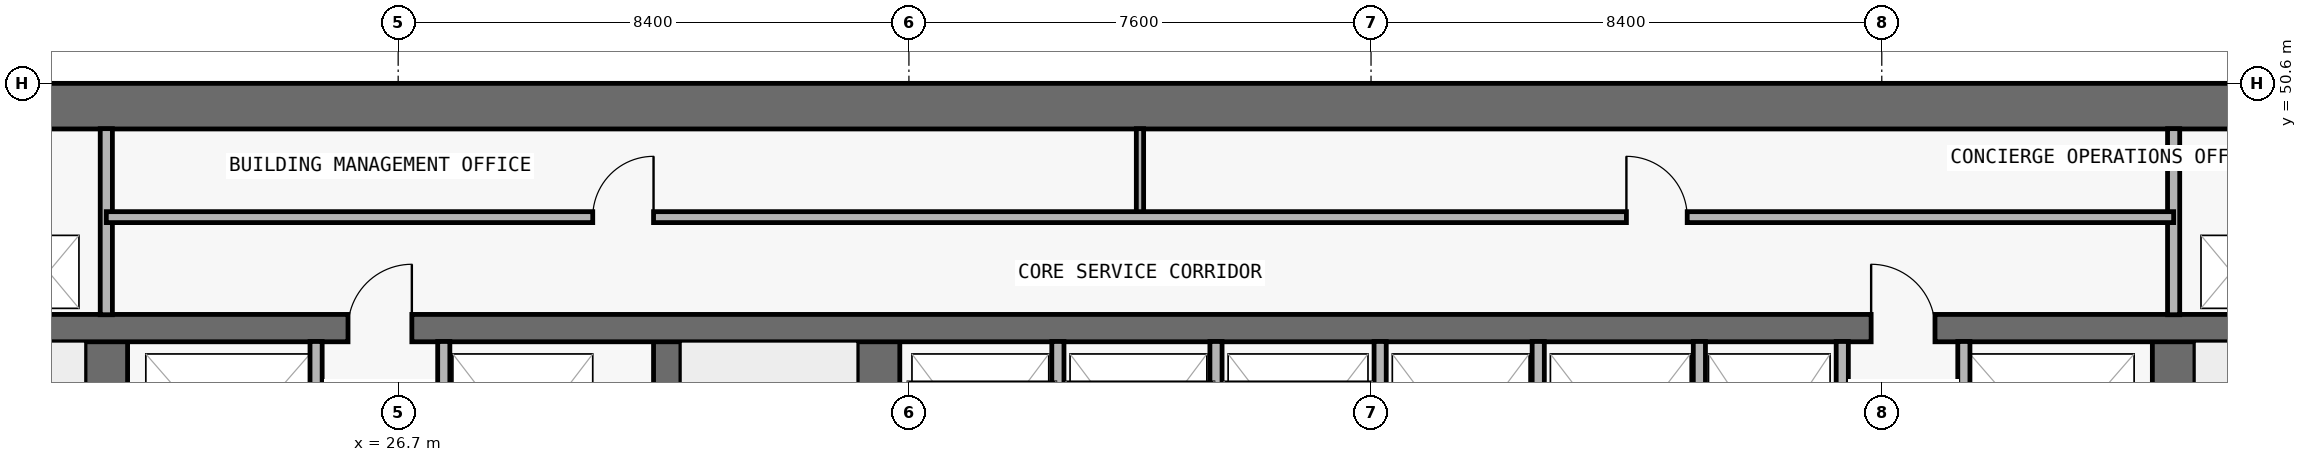
"""IFC4 building model, lengths in metres.
Left out: names, types, materials, properties, quantities, classifications, styles, units other than length and angle.
Written with IfcOpenShell. Run it as: python <this file> out.ifc"""

import sys

from ifc_helpers import new_model, si_unit, direction, frame, frame_2d, origin, place, context, subcontext, project, spatial, rectangle, extrude, element, fill, save


model = new_model("IFC4")
c1 = context("Model", 3, precision=1e-05, world=origin(), true_north=direction((0.0, 1.0)))
c2 = subcontext(c1, "Body", "Model", "MODEL_VIEW")
j1 = project(units=[si_unit("LENGTHUNIT", "METRE"), si_unit("PLANEANGLEUNIT", "RADIAN")], contexts=[c1])
p1 = place(None, origin())
s1 = spatial("IfcSite", under=j1, at=p1, CompositionType="ELEMENT")
p2 = place(p1, origin())
s2 = spatial("IfcBuilding", under=s1, at=p2, CompositionType="ELEMENT")
p3 = place(p2, frame((0.0, 0.0, 69.6)))
s3 = spatial("IfcBuildingStorey", under=s2, at=p3, CompositionType="ELEMENT", Elevation=69.6)
p4 = place(p3, frame((17.75, 50.225, 0.0), z_axis=(0.0, 0.0, 1.0), x_axis=(1.0, 0.0, 0.0)))
e1 = element("IfcWall", 1, at=p4, inside=s3, PredefinedType="SHEAR", context=c2, shape_type="SweptSolid", body=[
    extrude(rectangle(XDim=42.3, YDim=0.75, at=frame_2d((21.15, 0.0))), origin(), (0.0, 0.0, 1.0), 3.05),
])
p5 = place(p3, frame((21.9, 36.9, 0.0), z_axis=(0.0, 0.0, 1.0), x_axis=(0.0, 1.0, 0.0)))
e2 = element("IfcWall", 2, at=p5, inside=s3, PredefinedType="SHEAR", context=c2, shape_type="SweptSolid", body=[
    extrude(rectangle(XDim=9.675, YDim=0.7, at=frame_2d((4.837, 0.0))), origin(), (0.0, 0.0, 1.0), 3.05),
])
p6 = place(p5, frame((0.65, 0.0, 0.0)))
e3 = element("IfcOpeningElement", 3, at=p6, cuts=e2, PredefinedType="OPENING", context=c2, shape_type="SweptSolid", body=[
    extrude(rectangle(XDim=1.1, YDim=2.15, at=frame_2d((0.55, 1.075))), frame((0.0, 0.36, 0.0), z_axis=(0.0, -1.0, 0.0), x_axis=(1.0, 0.0, 0.0)), (0.0, 0.0, 1.0), 0.72),
])
p7 = place(p3, frame((55.9, 36.9, 0.0), z_axis=(0.0, 0.0, 1.0), x_axis=(0.0, 1.0, 0.0)))
e4 = element("IfcWall", 4, at=p7, inside=s3, PredefinedType="SHEAR", context=c2, shape_type="SweptSolid", body=[
    extrude(rectangle(XDim=9.675, YDim=0.7, at=frame_2d((4.837, 0.0))), origin(), (0.0, 0.0, 1.0), 3.05),
])
p8 = place(p7, frame((0.65, 0.0, 0.0)))
e5 = element("IfcOpeningElement", 5, at=p8, cuts=e4, PredefinedType="OPENING", context=c2, shape_type="SweptSolid", body=[
    extrude(rectangle(XDim=1.1, YDim=2.15, at=frame_2d((0.55, 1.075))), frame((0.0, 0.36, 0.0), z_axis=(0.0, -1.0, 0.0), x_axis=(1.0, 0.0, 0.0)), (0.0, 0.0, 1.0), 0.72),
])
p9 = place(p3, frame((31.125, 36.9, 0.0), z_axis=(0.0, 0.0, 1.0), x_axis=(0.0, 1.0, 0.0)))
e6 = element("IfcWall", 6, at=p9, inside=s3, PredefinedType="SHEAR", context=c2, shape_type="SweptSolid", body=[
    extrude(rectangle(XDim=9.675, YDim=0.45, at=frame_2d((4.837, 0.0))), origin(), (0.0, 0.0, 1.0), 3.05),
])
p10 = place(p3, frame((34.6, 36.9, 0.0), z_axis=(0.0, 0.0, 1.0), x_axis=(0.0, 1.0, 0.0)))
e7 = element("IfcWall", 7, at=p10, inside=s3, PredefinedType="SHEAR", context=c2, shape_type="SweptSolid", body=[
    extrude(rectangle(XDim=9.675, YDim=0.7, at=frame_2d((4.837, 0.0))), origin(), (0.0, 0.0, 1.0), 3.05),
])
p11 = place(p3, frame((18.2, 46.575, 0.0), z_axis=(0.0, 0.0, 1.0), x_axis=(1.0, 0.0, 0.0)))
e8 = element("IfcWall", 8, at=p11, inside=s3, PredefinedType="SHEAR", context=c2, shape_type="SweptSolid", body=[
    extrude(rectangle(XDim=41.4, YDim=0.45, at=frame_2d((20.7, 0.0))), origin(), (0.0, 0.0, 1.0), 3.05),
])
p12 = place(p11, frame((7.675, 0.0, 0.0)))
e9 = element("IfcOpeningElement", 9, at=p12, cuts=e8, PredefinedType="OPENING", context=c2, shape_type="SweptSolid", body=[
    extrude(rectangle(XDim=1.05, YDim=2.15, at=frame_2d((0.525, 1.075))), frame((0.0, 0.235, 0.0), z_axis=(0.0, -1.0, 0.0), x_axis=(1.0, 0.0, 0.0)), (0.0, 0.0, 1.0), 0.47),
])
p13 = place(p11, frame((32.725, 0.0, 0.0)))
e10 = element("IfcOpeningElement", 10, at=p13, cuts=e8, PredefinedType="OPENING", context=c2, shape_type="SweptSolid", body=[
    extrude(rectangle(XDim=1.05, YDim=2.15, at=frame_2d((0.525, 1.075))), frame((0.0, 0.235, 0.0), z_axis=(0.0, -1.0, 0.0), x_axis=(1.0, 0.0, 0.0)), (0.0, 0.0, 1.0), 0.47),
])
p14 = place(p3, frame((21.9, 46.795, 0.0), z_axis=(0.0, 0.0, 1.0), x_axis=(0.0, 1.0, 0.0)))
e11 = element("IfcWall", 11, at=p14, inside=s3, PredefinedType="PARTITIONING", context=c2, shape_type="SweptSolid", body=[
    extrude(rectangle(XDim=3.06, YDim=0.2, at=frame_2d((1.53, 0.0))), origin(), (0.0, 0.0, 1.0), 3.05),
])
for number, where, z_axis, x_axis in (
    (12, (25.35, 43.17, 0.0), (0.0, 0.0, 1.0), (0.0, 1.0, 0.0)),
    (13, (27.45, 43.17, 0.0), (0.0, 0.0, 1.0), (0.0, 1.0, 0.0)),
    (14, (37.55, 43.17, 0.0), (0.0, 0.0, 1.0), (0.0, 1.0, 0.0)),
):
    element("IfcWall", number, at=place(p3, frame(where, z_axis=z_axis, x_axis=x_axis)), inside=s3, PredefinedType="PARTITIONING", context=c2, shape_type="SweptSolid", body=[
        extrude(rectangle(XDim=3.185, YDim=0.2, at=frame_2d((1.593, 0.0))), origin(), (0.0, 0.0, 1.0), 3.05),
    ])
p15 = place(p3, frame((38.9, 48.4, 0.0), z_axis=(0.0, 0.0, 1.0), x_axis=(0.0, 1.0, 0.0)))
e15 = element("IfcWall", 15, at=p15, inside=s3, PredefinedType="PARTITIONING", context=c2, shape_type="SweptSolid", body=[
    extrude(rectangle(XDim=1.455, YDim=0.12, at=frame_2d((0.728, 0.0))), origin(), (0.0, 0.0, 1.0), 3.05),
])
for number, where, z_axis, x_axis in (
    (16, (40.15, 43.17, 0.0), (0.0, 0.0, 1.0), (0.0, 1.0, 0.0)),
    (17, (42.85, 43.17, 0.0), (0.0, 0.0, 1.0), (0.0, 1.0, 0.0)),
    (18, (45.45, 43.17, 0.0), (0.0, 0.0, 1.0), (0.0, 1.0, 0.0)),
    (19, (48.1, 43.17, 0.0), (0.0, 0.0, 1.0), (0.0, 1.0, 0.0)),
    (20, (50.45, 43.17, 0.0), (0.0, 0.0, 1.0), (0.0, 1.0, 0.0)),
    (21, (52.45, 43.17, 0.0), (0.0, 0.0, 1.0), (0.0, 1.0, 0.0)),
):
    element("IfcWall", number, at=place(p3, frame(where, z_axis=z_axis, x_axis=x_axis)), inside=s3, PredefinedType="PARTITIONING", context=c2, shape_type="SweptSolid", body=[
        extrude(rectangle(XDim=3.185, YDim=0.2, at=frame_2d((1.593, 0.0))), origin(), (0.0, 0.0, 1.0), 3.05),
    ])
p16 = place(p3, frame((55.9, 46.795, 0.0), z_axis=(0.0, 0.0, 1.0), x_axis=(0.0, 1.0, 0.0)))
e22 = element("IfcWall", 22, at=p16, inside=s3, PredefinedType="PARTITIONING", context=c2, shape_type="SweptSolid", body=[
    extrude(rectangle(XDim=3.06, YDim=0.2, at=frame_2d((1.53, 0.0))), origin(), (0.0, 0.0, 1.0), 3.05),
])
p17 = place(p3, frame((21.9, 48.4, 0.0), z_axis=(0.0, 0.0, 1.0), x_axis=(1.0, 0.0, 0.0)))
e23 = element("IfcWall", 23, at=p17, inside=s3, PredefinedType="PARTITIONING", context=c2, shape_type="SweptSolid", body=[
    extrude(rectangle(XDim=34.0, YDim=0.18, at=frame_2d((17.0, 0.0))), origin(), (0.0, 0.0, 1.0), 3.05),
])
p18 = place(p17, frame((8.0, 0.0, 0.0)))
e24 = element("IfcOpeningElement", 24, at=p18, cuts=e23, PredefinedType="OPENING", context=c2, shape_type="SweptSolid", body=[
    extrude(rectangle(XDim=1.0, YDim=2.2, at=frame_2d((0.5, 1.1))), frame((0.0, 0.1, 0.0), z_axis=(0.0, -1.0, 0.0), x_axis=(1.0, 0.0, 0.0)), (0.0, 0.0, 1.0), 0.2),
])
p19 = place(p17, frame((25.0, 0.0, 0.0)))
e25 = element("IfcOpeningElement", 25, at=p19, cuts=e23, PredefinedType="OPENING", context=c2, shape_type="SweptSolid", body=[
    extrude(rectangle(XDim=1.0, YDim=2.2, at=frame_2d((0.5, 1.1))), frame((0.0, 0.1, 0.0), z_axis=(0.0, -1.0, 0.0), x_axis=(1.0, 0.0, 0.0)), (0.0, 0.0, 1.0), 0.2),
])
p20 = place(p12, origin())
e26 = element("IfcDoor", 26, at=p20, inside=s3, OperationType="SINGLE_SWING_RIGHT", PredefinedType="DOOR", context=c2, shape_type="SweptSolid", body=[
    extrude(rectangle(XDim=1.05, YDim=2.15, at=frame_2d((0.525, 1.075))), frame((0.0, 0.025, 0.0), z_axis=(0.0, -1.0, 0.0), x_axis=(1.0, 0.0, 0.0)), (0.0, 0.0, 1.0), 0.05),
])
fill(e9, e26)
p21 = place(p13, origin())
e27 = element("IfcDoor", 27, at=p21, inside=s3, OperationType="SINGLE_SWING_LEFT", PredefinedType="DOOR", context=c2, shape_type="SweptSolid", body=[
    extrude(rectangle(XDim=1.05, YDim=2.15, at=frame_2d((0.525, 1.075))), frame((0.0, 0.025, 0.0), z_axis=(0.0, -1.0, 0.0), x_axis=(1.0, 0.0, 0.0)), (0.0, 0.0, 1.0), 0.05),
])
fill(e10, e27)
p22 = place(p18, origin())
e28 = element("IfcDoor", 28, at=p22, inside=s3, OperationType="SINGLE_SWING_RIGHT", PredefinedType="DOOR", context=c2, shape_type="SweptSolid", body=[
    extrude(rectangle(XDim=1.0, YDim=2.2, at=frame_2d((0.5, 1.1))), frame((0.0, 0.025, 0.0), z_axis=(0.0, -1.0, 0.0), x_axis=(1.0, 0.0, 0.0)), (0.0, 0.0, 1.0), 0.05),
])
fill(e24, e28)
p23 = place(p19, origin())
e29 = element("IfcDoor", 29, at=p23, inside=s3, OperationType="SINGLE_SWING_LEFT", PredefinedType="DOOR", context=c2, shape_type="SweptSolid", body=[
    extrude(rectangle(XDim=1.0, YDim=2.2, at=frame_2d((0.5, 1.1))), frame((0.0, 0.025, 0.0), z_axis=(0.0, -1.0, 0.0), x_axis=(1.0, 0.0, 0.0)), (0.0, 0.0, 1.0), 0.05),
])
fill(e25, e29)
save(model, sys.argv[1])
